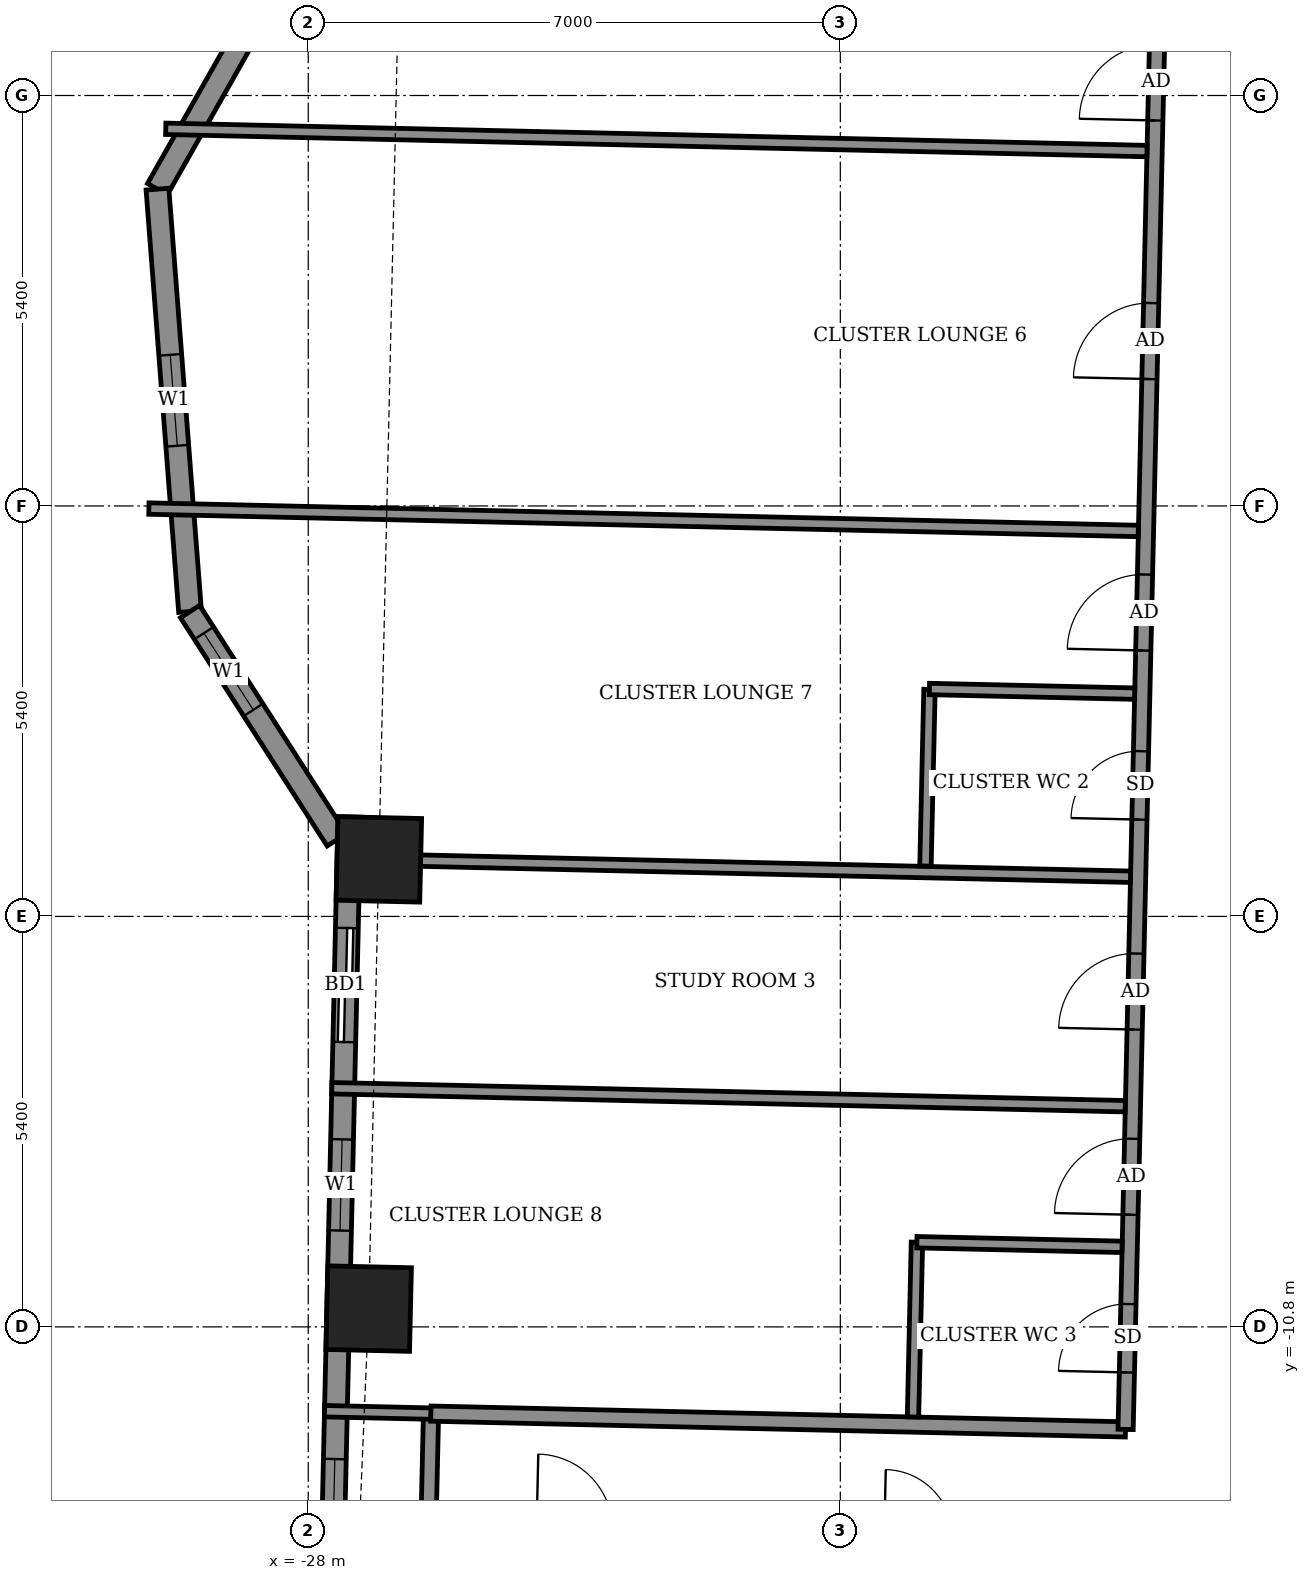
"""IFC4 building model, lengths in metres.
Left out: names, types, materials, properties, quantities, classifications, styles, units other than length and angle.
Written with IfcOpenShell. Run it as: python <this file> out.ifc"""

import sys

from ifc_helpers import new_model, si_unit, direction, frame, frame_2d, origin, origin_2d, place, context, subcontext, project, spatial, rectangle, extrude, element, fill, save


model = new_model("IFC4")
c1 = context("Model", 3, precision=1e-05, world=origin(), true_north=direction((0.0, 1.0)))
c2 = subcontext(c1, "Body", "Model", "MODEL_VIEW")
j1 = project(units=[si_unit("LENGTHUNIT", "METRE"), si_unit("PLANEANGLEUNIT", "RADIAN")], contexts=[c1])
p1 = place(None, origin())
s1 = spatial("IfcSite", under=j1, at=p1, CompositionType="ELEMENT")
p2 = place(p1, origin())
s2 = spatial("IfcBuilding", under=s1, at=p2, CompositionType="ELEMENT")
p3 = place(p2, frame((0.0, 0.0, 212.3)))
s3 = spatial("IfcBuildingStorey", under=s2, at=p3, CompositionType="ELEMENT", Elevation=212.3)
for number, where, z_axis, x_axis in (
    (1, (-27.071, -4.649, -0.55), (0.0, 0.0, 1.0), (-0.023, -1.0, 0.0)),
    (2, (-27.205, -10.56, -0.55), (0.0, 0.0, 1.0), (-0.023, -1.0, 0.0)),
):
    element("IfcColumn", number, at=place(p3, frame(where, z_axis=z_axis, x_axis=x_axis)), inside=s3, PredefinedType="COLUMN", context=c2, shape_type="SweptSolid", body=[
        extrude(rectangle(XDim=1.1, YDim=1.1, at=origin_2d()), origin(), (0.0, 0.0, 1.0), 3.6),
    ])
p4 = place(p3, frame((-27.325, 8.866, 0.0), z_axis=(0.0, 0.0, 1.0), x_axis=(-0.492554919955, -0.870281363025, 0.0)))
e3 = element("IfcWall", 3, at=p4, inside=s3, PredefinedType="SOLIDWALL", context=c2, shape_type="SweptSolid", body=[
    extrude(rectangle(XDim=5.398, YDim=0.3, at=frame_2d((2.699, 0.0))), origin(), (0.0, 0.0, 1.0), 3.05),
])
p5 = place(p4, frame((2.008, 0.0, 0.9)))
e4 = element("IfcOpeningElement", 4, at=p5, cuts=e3, PredefinedType="OPENING", context=c2, shape_type="SweptSolid", body=[
    extrude(rectangle(XDim=1.2, YDim=1.5, at=frame_2d((0.6, 0.75))), frame((0.0, 0.16, 0.0), z_axis=(0.0, -1.0, 0.0), x_axis=(1.0, 0.0, 0.0)), (0.0, 0.0, 1.0), 0.32),
])
p6 = place(p3, frame((-29.984, 4.168, 0.0), z_axis=(0.0, 0.0, 1.0), x_axis=(0.076964476481, -0.997033835614, 0.0)))
e5 = element("IfcWall", 5, at=p6, inside=s3, PredefinedType="SOLIDWALL", context=c2, shape_type="SweptSolid", body=[
    extrude(rectangle(XDim=5.573, YDim=0.3, at=frame_2d((2.787, 0.0))), origin(), (0.0, 0.0, 1.0), 3.05),
])
p7 = place(p6, frame((2.186, 0.0, 0.9)))
e6 = element("IfcOpeningElement", 6, at=p7, cuts=e5, PredefinedType="OPENING", context=c2, shape_type="SweptSolid", body=[
    extrude(rectangle(XDim=1.2, YDim=1.5, at=frame_2d((0.6, 0.75))), frame((0.0, 0.16, 0.0), z_axis=(0.0, -1.0, 0.0), x_axis=(1.0, 0.0, 0.0)), (0.0, 0.0, 1.0), 0.32),
])
p8 = place(p3, frame((-29.555, -1.389, 0.0), z_axis=(0.0, 0.0, 1.0), x_axis=(0.540622779574, -0.8412651248, 0.0)))
e7 = element("IfcWall", 7, at=p8, inside=s3, PredefinedType="SOLIDWALL", context=c2, shape_type="SweptSolid", body=[
    extrude(rectangle(XDim=3.57, YDim=0.3, at=frame_2d((1.785, 0.0))), origin(), (0.0, 0.0, 1.0), 3.05),
])
p9 = place(p8, frame((0.338, 0.0, 0.9)))
e8 = element("IfcOpeningElement", 8, at=p9, cuts=e7, PredefinedType="OPENING", context=c2, shape_type="SweptSolid", body=[
    extrude(rectangle(XDim=1.2, YDim=1.5, at=frame_2d((0.6, 0.75))), frame((0.0, 0.16, 0.0), z_axis=(0.0, -1.0, 0.0), x_axis=(1.0, 0.0, 0.0)), (0.0, 0.0, 1.0), 0.32),
])
p10 = place(p3, frame((-27.459, -4.091, 0.0), z_axis=(0.0, 0.0, 1.0), x_axis=(-0.022668325129, -0.999743040504, 0.0)))
e9 = element("IfcWall", 9, at=p10, inside=s3, PredefinedType="SOLIDWALL", context=c2, shape_type="SweptSolid", body=[
    extrude(rectangle(XDim=12.224, YDim=0.3, at=frame_2d((6.112, 0.0))), origin(), (0.0, 0.0, 1.0), 2.55),
])
p11 = place(p10, frame((1.462, 0.0, 0.0)))
e10 = element("IfcOpeningElement", 10, at=p11, cuts=e9, PredefinedType="OPENING", context=c2, shape_type="SweptSolid", body=[
    extrude(rectangle(XDim=1.5, YDim=2.4, at=frame_2d((0.75, 1.2))), frame((0.0, 0.16, 0.0), z_axis=(0.0, -1.0, 0.0), x_axis=(1.0, 0.0, 0.0)), (0.0, 0.0, 1.0), 0.32),
])
p12 = place(p10, frame((4.243, 0.0, 0.9)))
e11 = element("IfcOpeningElement", 11, at=p12, cuts=e9, PredefinedType="OPENING", context=c2, shape_type="SweptSolid", body=[
    extrude(rectangle(XDim=1.2, YDim=1.5, at=frame_2d((0.6, 0.75))), frame((0.0, 0.16, 0.0), z_axis=(0.0, -1.0, 0.0), x_axis=(1.0, 0.0, 0.0)), (0.0, 0.0, 1.0), 0.32),
])
p13 = place(p10, frame((8.45, 0.0, 0.9)))
e12 = element("IfcOpeningElement", 12, at=p13, cuts=e9, PredefinedType="OPENING", context=c2, shape_type="SweptSolid", body=[
    extrude(rectangle(XDim=2.4, YDim=1.5, at=frame_2d((1.2, 0.75))), frame((0.0, 0.16, 0.0), z_axis=(0.0, -1.0, 0.0), x_axis=(1.0, 0.0, 0.0)), (0.0, 0.0, 1.0), 0.32),
])
p14 = place(p3, frame((-30.42, -12.7, 0.0), z_axis=(0.0, 0.0, 1.0), x_axis=(0.022662255828, 0.999743178102, 0.0)))
e13 = element("IfcWall", 13, at=p14, inside=s3, PredefinedType="USERDEFINED", context=c2, shape_type="SweptSolid", body=[
    extrude(rectangle(XDim=6.0, YDim=0.55, at=frame_2d((3.0, 0.0))), origin(), (0.0, 0.0, 1.0), 0.8),
])
p15 = place(p3, frame((-26.419, -13.441, 0.0), z_axis=(0.0, 0.0, 1.0), x_axis=(0.022617910375, 0.999744182344, 0.0)))
e14 = element("IfcWall", 14, at=p15, inside=s3, PredefinedType="PARTITIONING", context=c2, shape_type="SweptSolid", body=[
    extrude(rectangle(XDim=1.5, YDim=0.2, at=frame_2d((0.75, 0.0))), origin(), (0.0, 0.0, 1.0), 3.05),
])
p16 = place(p3, frame((-27.786, -11.909, 0.0), z_axis=(0.0, 0.0, 1.0), x_axis=(0.999740216184, -0.022792545827, 0.0)))
e15 = element("IfcWall", 15, at=p16, inside=s3, PredefinedType="PARTITIONING", context=c2, shape_type="SweptSolid", body=[
    extrude(rectangle(XDim=1.403, YDim=0.15, at=frame_2d((0.702, 0.0))), origin(), (0.0, 0.0, 1.0), 2.55),
])
p17 = place(p3, frame((-26.387, -11.941, 0.0), z_axis=(0.0, 0.0, 1.0), x_axis=(0.999741076645, -0.022754772455, 0.0)))
e16 = element("IfcWall", 16, at=p17, inside=s3, PredefinedType="PARTITIONING", context=c2, shape_type="SweptSolid", body=[
    extrude(rectangle(XDim=9.141, YDim=0.2, at=frame_2d((4.571, 0.0))), origin(), (0.0, 0.0, 1.0), 3.05),
])
p18 = place(p3, frame((-20.044, -11.985, 0.0), z_axis=(0.0, 0.0, 1.0), x_axis=(0.022612884682, 0.999744296031, 0.0)))
e17 = element("IfcWall", 17, at=p18, inside=s3, PredefinedType="PARTITIONING", context=c2, shape_type="SweptSolid", body=[
    extrude(rectangle(XDim=2.3, YDim=0.15, at=frame_2d((1.15, 0.0))), origin(), (0.0, 0.0, 1.0), 3.05),
])
p19 = place(p3, frame((-17.247, -12.149, 0.0), z_axis=(0.0, 0.0, 1.0), x_axis=(0.022698146637, 0.999742363881, 0.0)))
e18 = element("IfcWall", 18, at=p19, inside=s3, PredefinedType="PARTITIONING", context=c2, shape_type="SweptSolid", body=[
    extrude(rectangle(XDim=28.374, YDim=0.2, at=frame_2d((14.187, 0.0))), origin(), (0.0, 0.0, 1.0), 3.05),
])
p20 = place(p19, frame((17.225, 0.0, 0.0)))
e19 = element("IfcOpeningElement", 19, at=p20, cuts=e18, PredefinedType="OPENING", context=c2, shape_type="SweptSolid", body=[
    extrude(rectangle(XDim=1.0, YDim=2.1, at=frame_2d((0.5, 1.05))), frame((0.0, 0.11, 0.0), z_axis=(0.0, -1.0, 0.0), x_axis=(1.0, 0.0, 0.0)), (0.0, 0.0, 1.0), 0.22),
])
p21 = place(p19, frame((19.375, 0.0, 0.0)))
e20 = element("IfcOpeningElement", 20, at=p21, cuts=e18, PredefinedType="OPENING", context=c2, shape_type="SweptSolid", body=[
    extrude(rectangle(XDim=0.9, YDim=2.1, at=frame_2d((0.45, 1.05))), frame((0.0, 0.11, 0.0), z_axis=(0.0, -1.0, 0.0), x_axis=(1.0, 0.0, 0.0)), (0.0, 0.0, 1.0), 0.22),
])
p22 = place(p19, frame((13.822, 0.0, 0.0)))
e21 = element("IfcOpeningElement", 21, at=p22, cuts=e18, PredefinedType="OPENING", context=c2, shape_type="SweptSolid", body=[
    extrude(rectangle(XDim=1.0, YDim=2.1, at=frame_2d((0.5, 1.05))), frame((0.0, 0.11, 0.0), z_axis=(0.0, -1.0, 0.0), x_axis=(1.0, 0.0, 0.0)), (0.0, 0.0, 1.0), 0.22),
])
p23 = place(p19, frame((10.25, 0.0, 0.0)))
e22 = element("IfcOpeningElement", 22, at=p23, cuts=e18, PredefinedType="OPENING", context=c2, shape_type="SweptSolid", body=[
    extrude(rectangle(XDim=1.0, YDim=2.1, at=frame_2d((0.5, 1.05))), frame((0.0, 0.11, 0.0), z_axis=(0.0, -1.0, 0.0), x_axis=(1.0, 0.0, 0.0)), (0.0, 0.0, 1.0), 0.22),
])
p24 = place(p19, frame((8.025, 0.0, 0.0)))
e23 = element("IfcOpeningElement", 23, at=p24, cuts=e18, PredefinedType="OPENING", context=c2, shape_type="SweptSolid", body=[
    extrude(rectangle(XDim=0.9, YDim=2.1, at=frame_2d((0.45, 1.05))), frame((0.0, 0.11, 0.0), z_axis=(0.0, -1.0, 0.0), x_axis=(1.0, 0.0, 0.0)), (0.0, 0.0, 1.0), 0.22),
])
p25 = place(p19, frame((5.262, 0.0, 0.0)))
e24 = element("IfcOpeningElement", 24, at=p25, cuts=e18, PredefinedType="OPENING", context=c2, shape_type="SweptSolid", body=[
    extrude(rectangle(XDim=1.0, YDim=2.1, at=frame_2d((0.5, 1.05))), frame((0.0, 0.11, 0.0), z_axis=(0.0, -1.0, 0.0), x_axis=(1.0, 0.0, 0.0)), (0.0, 0.0, 1.0), 0.22),
])
p26 = place(p19, frame((2.825, 0.0, 0.0)))
e25 = element("IfcOpeningElement", 25, at=p26, cuts=e18, PredefinedType="OPENING", context=c2, shape_type="SweptSolid", body=[
    extrude(rectangle(XDim=1.0, YDim=2.1, at=frame_2d((0.5, 1.05))), frame((0.0, 0.11, 0.0), z_axis=(0.0, -1.0, 0.0), x_axis=(1.0, 0.0, 0.0)), (0.0, 0.0, 1.0), 0.22),
])
p27 = place(p19, frame((0.75, 0.0, 0.0)))
e26 = element("IfcOpeningElement", 26, at=p27, cuts=e18, PredefinedType="OPENING", context=c2, shape_type="SweptSolid", body=[
    extrude(rectangle(XDim=0.9, YDim=2.1, at=frame_2d((0.45, 1.05))), frame((0.0, 0.11, 0.0), z_axis=(0.0, -1.0, 0.0), x_axis=(1.0, 0.0, 0.0)), (0.0, 0.0, 1.0), 0.22),
])
p28 = place(p3, frame((-19.993, -9.686, 0.0), z_axis=(0.0, 0.0, 1.0), x_axis=(0.999744396973, -0.02260842146, 0.0)))
e27 = element("IfcWall", 27, at=p28, inside=s3, PredefinedType="PARTITIONING", context=c2, shape_type="SweptSolid", body=[
    extrude(rectangle(XDim=2.7, YDim=0.15, at=frame_2d((1.35, 0.0))), origin(), (0.0, 0.0, 1.0), 3.05),
])
p29 = place(p3, frame((-27.69, -7.66, 0.0), z_axis=(0.0, 0.0, 1.0), x_axis=(0.99974219758, -0.022705470222, 0.0)))
e28 = element("IfcWall", 28, at=p29, inside=s3, PredefinedType="PARTITIONING", context=c2, shape_type="SweptSolid", body=[
    extrude(rectangle(XDim=10.441, YDim=0.15, at=frame_2d((5.22, 0.0))), origin(), (0.0, 0.0, 1.0), 2.55),
])
p30 = place(p3, frame((-27.322, -4.648, 0.0), z_axis=(0.0, 0.0, 1.0), x_axis=(0.999742841246, -0.022677111331, 0.0)))
e29 = element("IfcWall", 29, at=p30, inside=s3, PredefinedType="PARTITIONING", context=c2, shape_type="SweptSolid", body=[
    extrude(rectangle(XDim=10.142, YDim=0.15, at=frame_2d((5.071, 0.0))), origin(), (0.0, 0.0, 1.0), 3.05),
])
p31 = place(p3, frame((-19.88, -4.737, 0.0), z_axis=(0.0, 0.0, 1.0), x_axis=(0.02279059109, 0.999740260747, 0.0)))
e30 = element("IfcWall", 30, at=p31, inside=s3, PredefinedType="PARTITIONING", context=c2, shape_type="SweptSolid", body=[
    extrude(rectangle(XDim=2.324, YDim=0.15, at=frame_2d((1.162, 0.0))), origin(), (0.0, 0.0, 1.0), 3.05),
])
p32 = place(p3, frame((-19.828, -2.408, 0.0), z_axis=(0.0, 0.0, 1.0), x_axis=(0.99974458177, -0.022600248254, 0.0)))
e31 = element("IfcWall", 31, at=p32, inside=s3, PredefinedType="PARTITIONING", context=c2, shape_type="SweptSolid", body=[
    extrude(rectangle(XDim=2.701, YDim=0.15, at=frame_2d((1.35, 0.0))), origin(), (0.0, 0.0, 1.0), 3.05),
])
p33 = place(p3, frame((-30.097, -0.034, 0.0), z_axis=(0.0, 0.0, 1.0), x_axis=(0.999743005544, -0.022669866904, 0.0)))
e32 = element("IfcWall", 32, at=p33, inside=s3, PredefinedType="PARTITIONING", context=c2, shape_type="SweptSolid", body=[
    extrude(rectangle(XDim=13.02, YDim=0.15, at=frame_2d((6.51, 0.0))), origin(), (0.0, 0.0, 1.0), 2.1),
])
p34 = place(p3, frame((-29.875, 4.962, 0.0), z_axis=(0.0, 0.0, 1.0), x_axis=(0.999742567124, -0.022689193013, 0.0)))
e33 = element("IfcWall", 33, at=p34, inside=s3, PredefinedType="PARTITIONING", context=c2, shape_type="SweptSolid", body=[
    extrude(rectangle(XDim=12.912, YDim=0.15, at=frame_2d((6.456, 0.0))), origin(), (0.0, 0.0, 1.0), 2.1),
])
p35 = place(p7, origin())
e34 = element("IfcWindow", 34, at=p35, inside=s3, PartitioningType="SINGLE_PANEL", PredefinedType="WINDOW", context=c2, shape_type="SweptSolid", body=[
    extrude(rectangle(XDim=1.2, YDim=1.5, at=frame_2d((0.6, 0.75))), frame((0.0, 0.03, 0.0), z_axis=(0.0, -1.0, 0.0), x_axis=(1.0, 0.0, 0.0)), (0.0, 0.0, 1.0), 0.06),
])
fill(e6, e34)
p36 = place(p9, origin())
e35 = element("IfcWindow", 35, at=p36, inside=s3, PartitioningType="SINGLE_PANEL", PredefinedType="WINDOW", context=c2, shape_type="SweptSolid", body=[
    extrude(rectangle(XDim=1.2, YDim=1.5, at=frame_2d((0.6, 0.75))), frame((0.0, 0.03, 0.0), z_axis=(0.0, -1.0, 0.0), x_axis=(1.0, 0.0, 0.0)), (0.0, 0.0, 1.0), 0.06),
])
fill(e8, e35)
p37 = place(p11, origin())
e36 = element("IfcDoor", 36, at=p37, inside=s3, OperationType="SLIDING_TO_LEFT", PredefinedType="DOOR", context=c2, shape_type="SweptSolid", body=[
    extrude(rectangle(XDim=1.5, YDim=2.4, at=frame_2d((0.75, 1.2))), frame((0.0, 0.025, 0.0), z_axis=(0.0, -1.0, 0.0), x_axis=(1.0, 0.0, 0.0)), (0.0, 0.0, 1.0), 0.05),
])
fill(e10, e36)
p38 = place(p12, origin())
e37 = element("IfcWindow", 37, at=p38, inside=s3, PartitioningType="SINGLE_PANEL", PredefinedType="WINDOW", context=c2, shape_type="SweptSolid", body=[
    extrude(rectangle(XDim=1.2, YDim=1.5, at=frame_2d((0.6, 0.75))), frame((0.0, 0.03, 0.0), z_axis=(0.0, -1.0, 0.0), x_axis=(1.0, 0.0, 0.0)), (0.0, 0.0, 1.0), 0.06),
])
fill(e11, e37)
p39 = place(p13, origin())
e38 = element("IfcWindow", 38, at=p39, inside=s3, PartitioningType="DOUBLE_PANEL_VERTICAL", PredefinedType="WINDOW", context=c2, shape_type="SweptSolid", body=[
    extrude(rectangle(XDim=2.4, YDim=1.5, at=frame_2d((1.2, 0.75))), frame((0.0, 0.03, 0.0), z_axis=(0.0, -1.0, 0.0), x_axis=(1.0, 0.0, 0.0)), (0.0, 0.0, 1.0), 0.06),
])
fill(e12, e38)
p40 = place(p20, origin())
e39 = element("IfcDoor", 39, at=p40, inside=s3, OperationType="SINGLE_SWING_RIGHT", PredefinedType="DOOR", context=c2, shape_type="SweptSolid", body=[
    extrude(rectangle(XDim=1.0, YDim=2.1, at=frame_2d((0.5, 1.05))), frame((0.0, 0.025, 0.0), z_axis=(0.0, -1.0, 0.0), x_axis=(1.0, 0.0, 0.0)), (0.0, 0.0, 1.0), 0.05),
])
fill(e19, e39)
p41 = place(p22, origin())
e40 = element("IfcDoor", 40, at=p41, inside=s3, OperationType="SINGLE_SWING_LEFT", PredefinedType="DOOR", context=c2, shape_type="SweptSolid", body=[
    extrude(rectangle(XDim=1.0, YDim=2.1, at=frame_2d((0.5, 1.05))), frame((0.0, 0.025, 0.0), z_axis=(0.0, -1.0, 0.0), x_axis=(1.0, 0.0, 0.0)), (0.0, 0.0, 1.0), 0.05),
])
fill(e21, e40)
p42 = place(p23, origin())
e41 = element("IfcDoor", 41, at=p42, inside=s3, OperationType="SINGLE_SWING_RIGHT", PredefinedType="DOOR", context=c2, shape_type="SweptSolid", body=[
    extrude(rectangle(XDim=1.0, YDim=2.1, at=frame_2d((0.5, 1.05))), frame((0.0, 0.025, 0.0), z_axis=(0.0, -1.0, 0.0), x_axis=(1.0, 0.0, 0.0)), (0.0, 0.0, 1.0), 0.05),
])
fill(e22, e41)
p43 = place(p24, origin())
e42 = element("IfcDoor", 42, at=p43, inside=s3, OperationType="SINGLE_SWING_LEFT", PredefinedType="DOOR", context=c2, shape_type="SweptSolid", body=[
    extrude(rectangle(XDim=0.9, YDim=2.1, at=frame_2d((0.45, 1.05))), frame((0.0, 0.025, 0.0), z_axis=(0.0, -1.0, 0.0), x_axis=(1.0, 0.0, 0.0)), (0.0, 0.0, 1.0), 0.05),
])
fill(e23, e42)
p44 = place(p25, origin())
e43 = element("IfcDoor", 43, at=p44, inside=s3, OperationType="SINGLE_SWING_LEFT", PredefinedType="DOOR", context=c2, shape_type="SweptSolid", body=[
    extrude(rectangle(XDim=1.0, YDim=2.1, at=frame_2d((0.5, 1.05))), frame((0.0, 0.025, 0.0), z_axis=(0.0, -1.0, 0.0), x_axis=(1.0, 0.0, 0.0)), (0.0, 0.0, 1.0), 0.05),
])
fill(e24, e43)
p45 = place(p26, origin())
e44 = element("IfcDoor", 44, at=p45, inside=s3, OperationType="SINGLE_SWING_RIGHT", PredefinedType="DOOR", context=c2, shape_type="SweptSolid", body=[
    extrude(rectangle(XDim=1.0, YDim=2.1, at=frame_2d((0.5, 1.05))), frame((0.0, 0.025, 0.0), z_axis=(0.0, -1.0, 0.0), x_axis=(1.0, 0.0, 0.0)), (0.0, 0.0, 1.0), 0.05),
])
fill(e25, e44)
p46 = place(p27, origin())
e45 = element("IfcDoor", 45, at=p46, inside=s3, OperationType="SINGLE_SWING_RIGHT", PredefinedType="DOOR", context=c2, shape_type="SweptSolid", body=[
    extrude(rectangle(XDim=0.9, YDim=2.1, at=frame_2d((0.45, 1.05))), frame((0.0, 0.025, 0.0), z_axis=(0.0, -1.0, 0.0), x_axis=(1.0, 0.0, 0.0)), (0.0, 0.0, 1.0), 0.05),
])
fill(e26, e45)
save(model, sys.argv[1])
